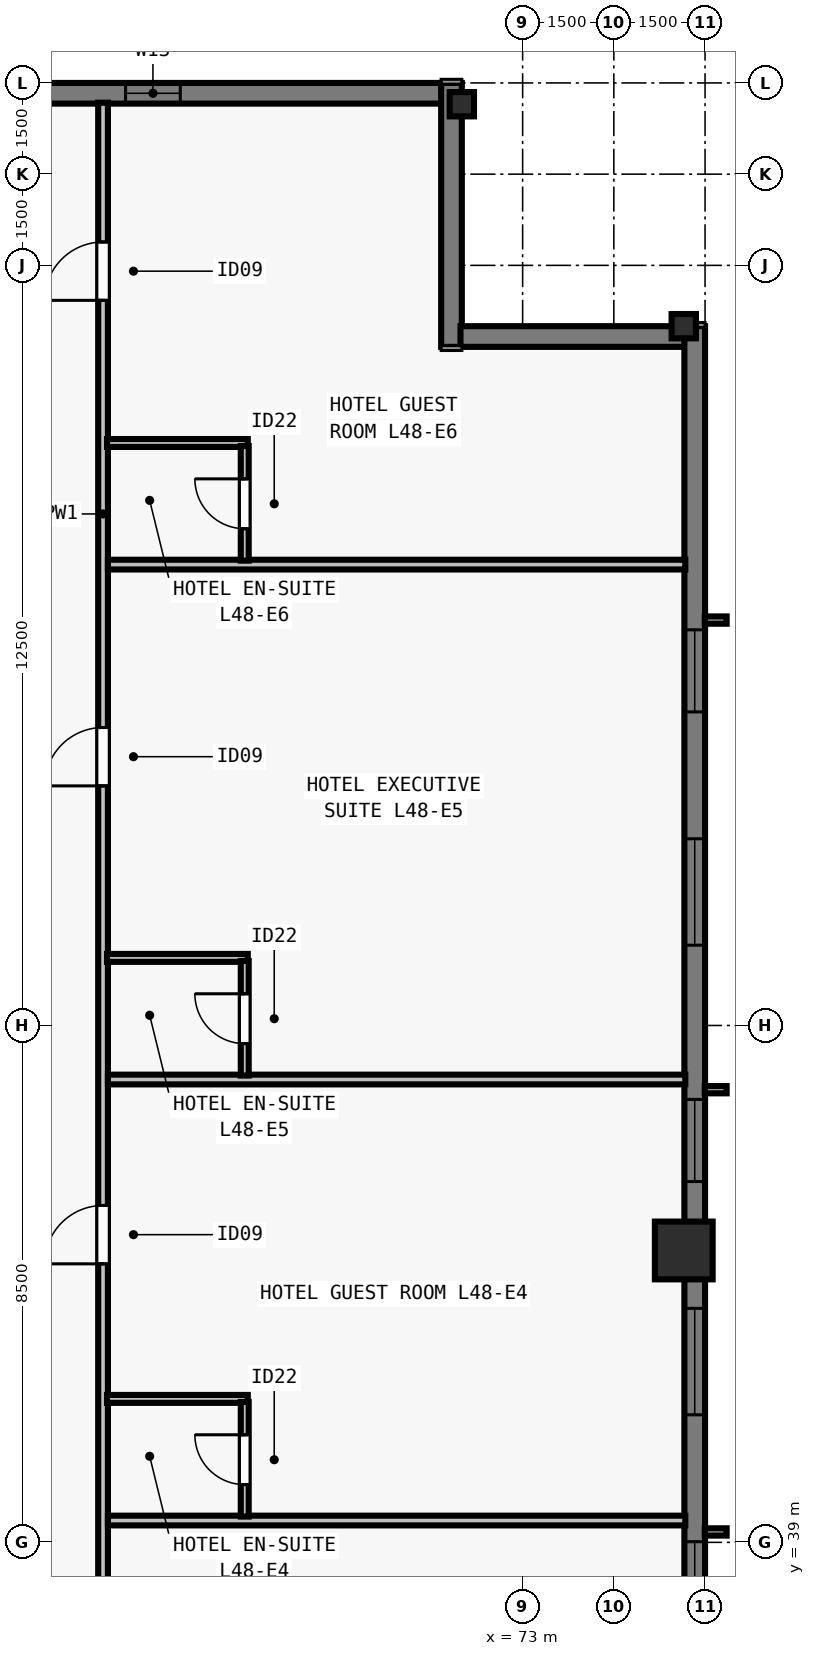
"""IFC4 building model, lengths in metres.
Left out: names, types, materials, properties, quantities, classifications, styles, units other than length and angle.
Written with IfcOpenShell. Run it as: python <this file> out.ifc"""

import sys

from ifc_helpers import new_model, si_unit, direction, frame, frame_2d, origin, origin_2d, place, context, subcontext, project, spatial, rectangle, i_section, extrude, element, fill, save


model = new_model("IFC4")
c1 = context("Model", 3, precision=1e-05, world=origin(), true_north=direction((0.0, 1.0)))
c2 = subcontext(c1, "Body", "Model", "MODEL_VIEW")
j1 = project(units=[si_unit("LENGTHUNIT", "METRE"), si_unit("PLANEANGLEUNIT", "RADIAN")], contexts=[c1])
p1 = place(None, origin())
s1 = spatial("IfcSite", under=j1, at=p1, CompositionType="ELEMENT")
p2 = place(p1, origin())
s2 = spatial("IfcBuilding", under=s1, at=p2, CompositionType="ELEMENT")
p3 = place(p2, frame((0.0, 0.0, 176.0)))
s3 = spatial("IfcBuildingStorey", under=s2, at=p3, CompositionType="ELEMENT", Elevation=176.0)
p4 = place(p3, frame((75.65, 43.8, 0.0), z_axis=(0.0, 0.0, 1.0), x_axis=(0.0, 1.0, 0.0)))
e1 = element("IfcColumn", 1, at=p4, inside=s3, PredefinedType="COLUMN", context=c2, shape_type="SweptSolid", body=[
    extrude(rectangle(XDim=0.95, YDim=0.95, at=origin_2d()), origin(), (0.0, 0.0, 1.0), 3.5),
])
for number, where, z_axis, x_axis in (
    (2, (75.65, 59.0, 0.0), (0.0, 0.0, 1.0), (0.0, 1.0, 0.0)),
    (3, (72.0, 62.65, 0.0), (0.0, 0.0, 1.0), (1.0, 0.0, 0.0)),
):
    element("IfcColumn", number, at=place(p3, frame(where, z_axis=z_axis, x_axis=x_axis)), inside=s3, PredefinedType="COLUMN", context=c2, shape_type="SweptSolid", body=[
        extrude(i_section(OverallWidth=0.4, OverallDepth=0.4, WebThickness=0.022, FlangeThickness=0.036, at=origin_2d()), origin(), (0.0, 0.0, 1.0), 3.5),
    ])
p5 = place(p3, frame((32.0, 62.83, 0.0), z_axis=(0.0, 0.0, 1.0), x_axis=(1.0, 0.0, 0.0)))
e4 = element("IfcWall", 4, at=p5, inside=s3, PredefinedType="SOLIDWALL", context=c2, shape_type="SweptSolid", body=[
    extrude(rectangle(XDim=39.682, YDim=0.34, at=frame_2d((19.841, 0.0))), origin(), (0.0, 0.0, 1.0), 3.28),
])
p6 = place(p5, frame((4.952, 0.0, 0.8)))
e5 = element("IfcOpeningElement", 5, at=p6, cuts=e4, PredefinedType="OPENING", context=c2, shape_type="SweptSolid", body=[
    extrude(rectangle(XDim=1.35, YDim=1.66, at=frame_2d((0.675, 0.83))), frame((0.0, 0.18, 0.0), z_axis=(0.0, -1.0, 0.0), x_axis=(1.0, 0.0, 0.0)), (0.0, 0.0, 1.0), 0.36),
])
p7 = place(p5, frame((12.059, 0.0, 0.8)))
e6 = element("IfcOpeningElement", 6, at=p7, cuts=e4, PredefinedType="OPENING", context=c2, shape_type="SweptSolid", body=[
    extrude(rectangle(XDim=1.35, YDim=1.66, at=frame_2d((0.675, 0.83))), frame((0.0, 0.18, 0.0), z_axis=(0.0, -1.0, 0.0), x_axis=(1.0, 0.0, 0.0)), (0.0, 0.0, 1.0), 0.36),
])
p8 = place(p5, frame((19.166, 0.0, 0.8)))
e7 = element("IfcOpeningElement", 7, at=p8, cuts=e4, PredefinedType="OPENING", context=c2, shape_type="SweptSolid", body=[
    extrude(rectangle(XDim=1.35, YDim=1.66, at=frame_2d((0.675, 0.83))), frame((0.0, 0.18, 0.0), z_axis=(0.0, -1.0, 0.0), x_axis=(1.0, 0.0, 0.0)), (0.0, 0.0, 1.0), 0.36),
])
p9 = place(p5, frame((21.27, 0.0, 0.8)))
e8 = element("IfcOpeningElement", 8, at=p9, cuts=e4, PredefinedType="OPENING", context=c2, shape_type="SweptSolid", body=[
    extrude(rectangle(XDim=1.75, YDim=1.66, at=frame_2d((0.875, 0.83))), frame((0.0, 0.18, 0.0), z_axis=(0.0, -1.0, 0.0), x_axis=(1.0, 0.0, 0.0)), (0.0, 0.0, 1.0), 0.36),
])
p10 = place(p5, frame((26.273, 0.0, 0.8)))
e9 = element("IfcOpeningElement", 9, at=p10, cuts=e4, PredefinedType="OPENING", context=c2, shape_type="SweptSolid", body=[
    extrude(rectangle(XDim=1.35, YDim=1.66, at=frame_2d((0.675, 0.83))), frame((0.0, 0.18, 0.0), z_axis=(0.0, -1.0, 0.0), x_axis=(1.0, 0.0, 0.0)), (0.0, 0.0, 1.0), 0.36),
])
p11 = place(p5, frame((29.627, 0.0, 0.8)))
e10 = element("IfcOpeningElement", 10, at=p11, cuts=e4, PredefinedType="OPENING", context=c2, shape_type="SweptSolid", body=[
    extrude(rectangle(XDim=1.75, YDim=1.66, at=frame_2d((0.875, 0.83))), frame((0.0, 0.18, 0.0), z_axis=(0.0, -1.0, 0.0), x_axis=(1.0, 0.0, 0.0)), (0.0, 0.0, 1.0), 0.36),
])
p12 = place(p5, frame((34.47, 0.0, 0.8)))
e11 = element("IfcOpeningElement", 11, at=p12, cuts=e4, PredefinedType="OPENING", context=c2, shape_type="SweptSolid", body=[
    extrude(rectangle(XDim=0.9, YDim=1.66, at=frame_2d((0.45, 0.83))), frame((0.0, 0.18, 0.0), z_axis=(0.0, -1.0, 0.0), x_axis=(1.0, 0.0, 0.0)), (0.0, 0.0, 1.0), 0.36),
])
p13 = place(p3, frame((71.83, 63.0, 0.0), z_axis=(0.0, 0.0, 1.0), x_axis=(0.0, -1.0, 0.0)))
e12 = element("IfcWall", 12, at=p13, inside=s3, PredefinedType="SOLIDWALL", context=c2, shape_type="SweptSolid", body=[
    extrude(rectangle(XDim=4.34, YDim=0.34, at=frame_2d((2.17, 0.0))), origin(), (0.0, 0.0, 1.0), 3.28),
])
p14 = place(p3, frame((71.978, 58.83, 0.0), z_axis=(0.0, 0.0, 1.0), x_axis=(1.0, 0.0, 0.0)))
e13 = element("IfcWall", 13, at=p14, inside=s3, PredefinedType="SOLIDWALL", context=c2, shape_type="SweptSolid", body=[
    extrude(rectangle(XDim=3.704, YDim=0.34, at=frame_2d((1.852, 0.0))), origin(), (0.0, 0.0, 1.0), 3.28),
])
p15 = place(p3, frame((75.83, 59.0, 0.0), z_axis=(0.0, 0.0, 1.0), x_axis=(0.0, -1.0, 0.0)))
e14 = element("IfcWall", 14, at=p15, inside=s3, PredefinedType="SOLIDWALL", context=c2, shape_type="SweptSolid", body=[
    extrude(rectangle(XDim=25.882, YDim=0.34, at=frame_2d((12.941, 0.0))), origin(), (0.0, 0.0, 1.0), 3.28),
])
p16 = place(p15, frame((4.993, 0.0, 0.8)))
e15 = element("IfcOpeningElement", 15, at=p16, cuts=e14, PredefinedType="OPENING", context=c2, shape_type="SweptSolid", body=[
    extrude(rectangle(XDim=1.35, YDim=1.66, at=frame_2d((0.675, 0.83))), frame((0.0, 0.18, 0.0), z_axis=(0.0, -1.0, 0.0), x_axis=(1.0, 0.0, 0.0)), (0.0, 0.0, 1.0), 0.36),
])
p17 = place(p15, frame((8.43, 0.0, 0.8)))
e16 = element("IfcOpeningElement", 16, at=p17, cuts=e14, PredefinedType="OPENING", context=c2, shape_type="SweptSolid", body=[
    extrude(rectangle(XDim=1.75, YDim=1.66, at=frame_2d((0.875, 0.83))), frame((0.0, 0.18, 0.0), z_axis=(0.0, -1.0, 0.0), x_axis=(1.0, 0.0, 0.0)), (0.0, 0.0, 1.0), 0.36),
])
p18 = place(p15, frame((12.716, 0.0, 0.8)))
e17 = element("IfcOpeningElement", 17, at=p18, cuts=e14, PredefinedType="OPENING", context=c2, shape_type="SweptSolid", body=[
    extrude(rectangle(XDim=1.35, YDim=1.66, at=frame_2d((0.675, 0.83))), frame((0.0, 0.18, 0.0), z_axis=(0.0, -1.0, 0.0), x_axis=(1.0, 0.0, 0.0)), (0.0, 0.0, 1.0), 0.36),
])
p19 = place(p15, frame((16.152, 0.0, 0.8)))
e18 = element("IfcOpeningElement", 18, at=p19, cuts=e14, PredefinedType="OPENING", context=c2, shape_type="SweptSolid", body=[
    extrude(rectangle(XDim=1.75, YDim=1.66, at=frame_2d((0.875, 0.83))), frame((0.0, 0.18, 0.0), z_axis=(0.0, -1.0, 0.0), x_axis=(1.0, 0.0, 0.0)), (0.0, 0.0, 1.0), 0.36),
])
p20 = place(p15, frame((19.989, 0.0, 0.8)))
e19 = element("IfcOpeningElement", 19, at=p20, cuts=e14, PredefinedType="OPENING", context=c2, shape_type="SweptSolid", body=[
    extrude(rectangle(XDim=1.35, YDim=1.66, at=frame_2d((0.675, 0.83))), frame((0.0, 0.18, 0.0), z_axis=(0.0, -1.0, 0.0), x_axis=(1.0, 0.0, 0.0)), (0.0, 0.0, 1.0), 0.36),
])
p21 = place(p3, frame((66.1, 15.325, 0.0), z_axis=(0.0, 0.0, 1.0), x_axis=(0.0, 1.0, 0.0)))
e20 = element("IfcWall", 20, at=p21, inside=s3, PredefinedType="PARTITIONING", context=c2, shape_type="SweptSolid", body=[
    extrude(rectangle(XDim=47.35, YDim=0.16, at=frame_2d((23.675, 0.0))), origin(), (0.0, 0.0, 1.0), 2.555),
])
p22 = place(p21, frame((5.025, 0.0, 0.0)))
e21 = element("IfcOpeningElement", 21, at=p22, cuts=e20, PredefinedType="OPENING", context=c2, shape_type="SweptSolid", body=[
    extrude(rectangle(XDim=0.96, YDim=2.15, at=frame_2d((0.48, 1.075))), frame((0.0, 0.09, 0.0), z_axis=(0.0, -1.0, 0.0), x_axis=(1.0, 0.0, 0.0)), (0.0, 0.0, 1.0), 0.18),
])
p23 = place(p21, frame((12.535, 0.0, 0.0)))
e22 = element("IfcOpeningElement", 22, at=p23, cuts=e20, PredefinedType="OPENING", context=c2, shape_type="SweptSolid", body=[
    extrude(rectangle(XDim=0.96, YDim=2.15, at=frame_2d((0.48, 1.075))), frame((0.0, 0.09, 0.0), z_axis=(0.0, -1.0, 0.0), x_axis=(1.0, 0.0, 0.0)), (0.0, 0.0, 1.0), 0.18),
])
p24 = place(p21, frame((20.395, 0.0, 0.0)))
e23 = element("IfcOpeningElement", 23, at=p24, cuts=e20, PredefinedType="OPENING", context=c2, shape_type="SweptSolid", body=[
    extrude(rectangle(XDim=0.96, YDim=2.15, at=frame_2d((0.48, 1.075))), frame((0.0, 0.09, 0.0), z_axis=(0.0, -1.0, 0.0), x_axis=(1.0, 0.0, 0.0)), (0.0, 0.0, 1.0), 0.18),
])
p25 = place(p21, frame((28.255, 0.0, 0.0)))
e24 = element("IfcOpeningElement", 24, at=p25, cuts=e20, PredefinedType="OPENING", context=c2, shape_type="SweptSolid", body=[
    extrude(rectangle(XDim=0.96, YDim=2.15, at=frame_2d((0.48, 1.075))), frame((0.0, 0.09, 0.0), z_axis=(0.0, -1.0, 0.0), x_axis=(1.0, 0.0, 0.0)), (0.0, 0.0, 1.0), 0.18),
])
p26 = place(p21, frame((36.115, 0.0, 0.0)))
e25 = element("IfcOpeningElement", 25, at=p26, cuts=e20, PredefinedType="OPENING", context=c2, shape_type="SweptSolid", body=[
    extrude(rectangle(XDim=0.96, YDim=2.15, at=frame_2d((0.48, 1.075))), frame((0.0, 0.09, 0.0), z_axis=(0.0, -1.0, 0.0), x_axis=(1.0, 0.0, 0.0)), (0.0, 0.0, 1.0), 0.18),
])
p27 = place(p21, frame((44.1, 0.0, 0.0)))
e26 = element("IfcOpeningElement", 26, at=p27, cuts=e20, PredefinedType="OPENING", context=c2, shape_type="SweptSolid", body=[
    extrude(rectangle(XDim=0.96, YDim=2.15, at=frame_2d((0.48, 1.075))), frame((0.0, 0.09, 0.0), z_axis=(0.0, -1.0, 0.0), x_axis=(1.0, 0.0, 0.0)), (0.0, 0.0, 1.0), 0.18),
])
p28 = place(p3, frame((66.18, 39.359, 0.0), z_axis=(0.0, 0.0, 1.0), x_axis=(1.0, 0.0, 0.0)))
e27 = element("IfcWall", 27, at=p28, inside=s3, PredefinedType="PARTITIONING", context=c2, shape_type="SweptSolid", body=[
    extrude(rectangle(XDim=9.495, YDim=0.16, at=frame_2d((4.748, 0.0))), origin(), (0.0, 0.0, 1.0), 3.28),
])
p29 = place(p3, frame((66.165, 41.359, 0.0), z_axis=(0.0, 0.0, 1.0), x_axis=(1.0, 0.0, 0.0)))
e28 = element("IfcWall", 28, at=p29, inside=s3, PredefinedType="PLUMBINGWALL", context=c2, shape_type="SweptSolid", body=[
    extrude(rectangle(XDim=2.315, YDim=0.13, at=frame_2d((1.157, 0.0))), origin(), (0.0, 0.0, 1.0), 3.28),
])
p30 = place(p3, frame((68.43, 39.424, 0.0), z_axis=(0.0, 0.0, 1.0), x_axis=(0.0, 1.0, 0.0)))
e29 = element("IfcWall", 29, at=p30, inside=s3, PredefinedType="PLUMBINGWALL", context=c2, shape_type="SweptSolid", body=[
    extrude(rectangle(XDim=1.885, YDim=0.13, at=frame_2d((0.942, 0.0))), origin(), (0.0, 0.0, 1.0), 3.28),
])
p31 = place(p30, frame((0.525, 0.0, 0.0)))
e30 = element("IfcOpeningElement", 30, at=p31, cuts=e29, PredefinedType="OPENING", context=c2, shape_type="SweptSolid", body=[
    extrude(rectangle(XDim=0.82, YDim=2.1, at=frame_2d((0.41, 1.05))), frame((0.0, 0.075, 0.0), z_axis=(0.0, -1.0, 0.0), x_axis=(1.0, 0.0, 0.0)), (0.0, 0.0, 1.0), 0.15),
])
p32 = place(p3, frame((66.18, 46.611, 0.0), z_axis=(0.0, 0.0, 1.0), x_axis=(1.0, 0.0, 0.0)))
e31 = element("IfcWall", 31, at=p32, inside=s3, PredefinedType="PARTITIONING", context=c2, shape_type="SweptSolid", body=[
    extrude(rectangle(XDim=9.495, YDim=0.16, at=frame_2d((4.748, 0.0))), origin(), (0.0, 0.0, 1.0), 3.28),
])
p33 = place(p3, frame((66.165, 48.611, 0.0), z_axis=(0.0, 0.0, 1.0), x_axis=(1.0, 0.0, 0.0)))
e32 = element("IfcWall", 32, at=p33, inside=s3, PredefinedType="PLUMBINGWALL", context=c2, shape_type="SweptSolid", body=[
    extrude(rectangle(XDim=2.315, YDim=0.13, at=frame_2d((1.157, 0.0))), origin(), (0.0, 0.0, 1.0), 3.28),
])
p34 = place(p3, frame((68.43, 46.677, 0.0), z_axis=(0.0, 0.0, 1.0), x_axis=(0.0, 1.0, 0.0)))
e33 = element("IfcWall", 33, at=p34, inside=s3, PredefinedType="PLUMBINGWALL", context=c2, shape_type="SweptSolid", body=[
    extrude(rectangle(XDim=1.885, YDim=0.13, at=frame_2d((0.942, 0.0))), origin(), (0.0, 0.0, 1.0), 3.28),
])
p35 = place(p34, frame((0.525, 0.0, 0.0)))
e34 = element("IfcOpeningElement", 34, at=p35, cuts=e33, PredefinedType="OPENING", context=c2, shape_type="SweptSolid", body=[
    extrude(rectangle(XDim=0.82, YDim=2.1, at=frame_2d((0.41, 1.05))), frame((0.0, 0.075, 0.0), z_axis=(0.0, -1.0, 0.0), x_axis=(1.0, 0.0, 0.0)), (0.0, 0.0, 1.0), 0.15),
])
p36 = place(p3, frame((66.18, 55.079, 0.0), z_axis=(0.0, 0.0, 1.0), x_axis=(1.0, 0.0, 0.0)))
e35 = element("IfcWall", 35, at=p36, inside=s3, PredefinedType="PARTITIONING", context=c2, shape_type="SweptSolid", body=[
    extrude(rectangle(XDim=9.495, YDim=0.16, at=frame_2d((4.748, 0.0))), origin(), (0.0, 0.0, 1.0), 2.896),
])
p37 = place(p3, frame((66.165, 57.079, 0.0), z_axis=(0.0, 0.0, 1.0), x_axis=(1.0, 0.0, 0.0)))
e36 = element("IfcWall", 36, at=p37, inside=s3, PredefinedType="PLUMBINGWALL", context=c2, shape_type="SweptSolid", body=[
    extrude(rectangle(XDim=2.315, YDim=0.13, at=frame_2d((1.157, 0.0))), origin(), (0.0, 0.0, 1.0), 3.28),
])
p38 = place(p3, frame((68.43, 55.144, 0.0), z_axis=(0.0, 0.0, 1.0), x_axis=(0.0, 1.0, 0.0)))
e37 = element("IfcWall", 37, at=p38, inside=s3, PredefinedType="PLUMBINGWALL", context=c2, shape_type="SweptSolid", body=[
    extrude(rectangle(XDim=1.885, YDim=0.13, at=frame_2d((0.942, 0.0))), origin(), (0.0, 0.0, 1.0), 3.28),
])
p39 = place(p38, frame((0.525, 0.0, 0.0)))
e38 = element("IfcOpeningElement", 38, at=p39, cuts=e37, PredefinedType="OPENING", context=c2, shape_type="SweptSolid", body=[
    extrude(rectangle(XDim=0.82, YDim=2.1, at=frame_2d((0.41, 1.05))), frame((0.0, 0.075, 0.0), z_axis=(0.0, -1.0, 0.0), x_axis=(1.0, 0.0, 0.0)), (0.0, 0.0, 1.0), 0.15),
])
p40 = place(p16, origin())
e39 = element("IfcWindow", 39, at=p40, inside=s3, PartitioningType="SINGLE_PANEL", PredefinedType="WINDOW", context=c2, shape_type="SweptSolid", body=[
    extrude(rectangle(XDim=1.35, YDim=1.66, at=frame_2d((0.675, 0.83))), frame((0.0, -0.05, 0.0), z_axis=(0.0, -1.0, 0.0), x_axis=(1.0, 0.0, 0.0)), (0.0, 0.0, 1.0), 0.06),
])
fill(e15, e39)
p41 = place(p17, origin())
e40 = element("IfcWindow", 40, at=p41, inside=s3, PartitioningType="SINGLE_PANEL", PredefinedType="WINDOW", context=c2, shape_type="SweptSolid", body=[
    extrude(rectangle(XDim=1.75, YDim=1.66, at=frame_2d((0.875, 0.83))), frame((0.0, -0.05, 0.0), z_axis=(0.0, -1.0, 0.0), x_axis=(1.0, 0.0, 0.0)), (0.0, 0.0, 1.0), 0.06),
])
fill(e16, e40)
p42 = place(p18, origin())
e41 = element("IfcWindow", 41, at=p42, inside=s3, PartitioningType="SINGLE_PANEL", PredefinedType="WINDOW", context=c2, shape_type="SweptSolid", body=[
    extrude(rectangle(XDim=1.35, YDim=1.66, at=frame_2d((0.675, 0.83))), frame((0.0, -0.05, 0.0), z_axis=(0.0, -1.0, 0.0), x_axis=(1.0, 0.0, 0.0)), (0.0, 0.0, 1.0), 0.06),
])
fill(e17, e41)
p43 = place(p19, origin())
e42 = element("IfcWindow", 42, at=p43, inside=s3, PartitioningType="SINGLE_PANEL", PredefinedType="WINDOW", context=c2, shape_type="SweptSolid", body=[
    extrude(rectangle(XDim=1.75, YDim=1.66, at=frame_2d((0.875, 0.83))), frame((0.0, -0.05, 0.0), z_axis=(0.0, -1.0, 0.0), x_axis=(1.0, 0.0, 0.0)), (0.0, 0.0, 1.0), 0.06),
])
fill(e18, e42)
p44 = place(p20, origin())
e43 = element("IfcWindow", 43, at=p44, inside=s3, PartitioningType="SINGLE_PANEL", PredefinedType="WINDOW", context=c2, shape_type="SweptSolid", body=[
    extrude(rectangle(XDim=1.35, YDim=1.66, at=frame_2d((0.675, 0.83))), frame((0.0, -0.05, 0.0), z_axis=(0.0, -1.0, 0.0), x_axis=(1.0, 0.0, 0.0)), (0.0, 0.0, 1.0), 0.06),
])
fill(e19, e43)
p45 = place(p12, origin())
e44 = element("IfcWindow", 44, at=p45, inside=s3, PartitioningType="SINGLE_PANEL", PredefinedType="WINDOW", context=c2, shape_type="SweptSolid", body=[
    extrude(rectangle(XDim=0.9, YDim=1.66, at=frame_2d((0.45, 0.83))), frame((0.0, -0.04, 0.0), z_axis=(0.0, -1.0, 0.0), x_axis=(1.0, 0.0, 0.0)), (0.0, 0.0, 1.0), 0.06),
])
fill(e11, e44)
p46 = place(p31, origin())
e45 = element("IfcDoor", 45, at=p46, inside=s3, OperationType="SINGLE_SWING_RIGHT", PredefinedType="DOOR", context=c2, shape_type="SweptSolid", body=[
    extrude(rectangle(XDim=0.82, YDim=2.1, at=frame_2d((0.41, 1.05))), frame((0.0, 0.025, 0.0), z_axis=(0.0, -1.0, 0.0), x_axis=(1.0, 0.0, 0.0)), (0.0, 0.0, 1.0), 0.05),
])
fill(e30, e45)
p47 = place(p25, origin())
e46 = element("IfcDoor", 46, at=p47, inside=s3, OperationType="SINGLE_SWING_LEFT", PredefinedType="DOOR", context=c2, shape_type="SweptSolid", body=[
    extrude(rectangle(XDim=0.96, YDim=2.15, at=frame_2d((0.48, 1.075))), frame((0.0, 0.025, 0.0), z_axis=(0.0, -1.0, 0.0), x_axis=(1.0, 0.0, 0.0)), (0.0, 0.0, 1.0), 0.05),
])
fill(e24, e46)
p48 = place(p35, origin())
e47 = element("IfcDoor", 47, at=p48, inside=s3, OperationType="SINGLE_SWING_RIGHT", PredefinedType="DOOR", context=c2, shape_type="SweptSolid", body=[
    extrude(rectangle(XDim=0.82, YDim=2.1, at=frame_2d((0.41, 1.05))), frame((0.0, 0.025, 0.0), z_axis=(0.0, -1.0, 0.0), x_axis=(1.0, 0.0, 0.0)), (0.0, 0.0, 1.0), 0.05),
])
fill(e34, e47)
p49 = place(p26, origin())
e48 = element("IfcDoor", 48, at=p49, inside=s3, OperationType="SINGLE_SWING_LEFT", PredefinedType="DOOR", context=c2, shape_type="SweptSolid", body=[
    extrude(rectangle(XDim=0.96, YDim=2.15, at=frame_2d((0.48, 1.075))), frame((0.0, 0.025, 0.0), z_axis=(0.0, -1.0, 0.0), x_axis=(1.0, 0.0, 0.0)), (0.0, 0.0, 1.0), 0.05),
])
fill(e25, e48)
p50 = place(p39, origin())
e49 = element("IfcDoor", 49, at=p50, inside=s3, OperationType="SINGLE_SWING_RIGHT", PredefinedType="DOOR", context=c2, shape_type="SweptSolid", body=[
    extrude(rectangle(XDim=0.82, YDim=2.1, at=frame_2d((0.41, 1.05))), frame((0.0, 0.025, 0.0), z_axis=(0.0, -1.0, 0.0), x_axis=(1.0, 0.0, 0.0)), (0.0, 0.0, 1.0), 0.05),
])
fill(e38, e49)
p51 = place(p27, origin())
e50 = element("IfcDoor", 50, at=p51, inside=s3, OperationType="SINGLE_SWING_LEFT", PredefinedType="DOOR", context=c2, shape_type="SweptSolid", body=[
    extrude(rectangle(XDim=0.96, YDim=2.15, at=frame_2d((0.48, 1.075))), frame((0.0, 0.025, 0.0), z_axis=(0.0, -1.0, 0.0), x_axis=(1.0, 0.0, 0.0)), (0.0, 0.0, 1.0), 0.05),
])
fill(e26, e50)
save(model, sys.argv[1])
